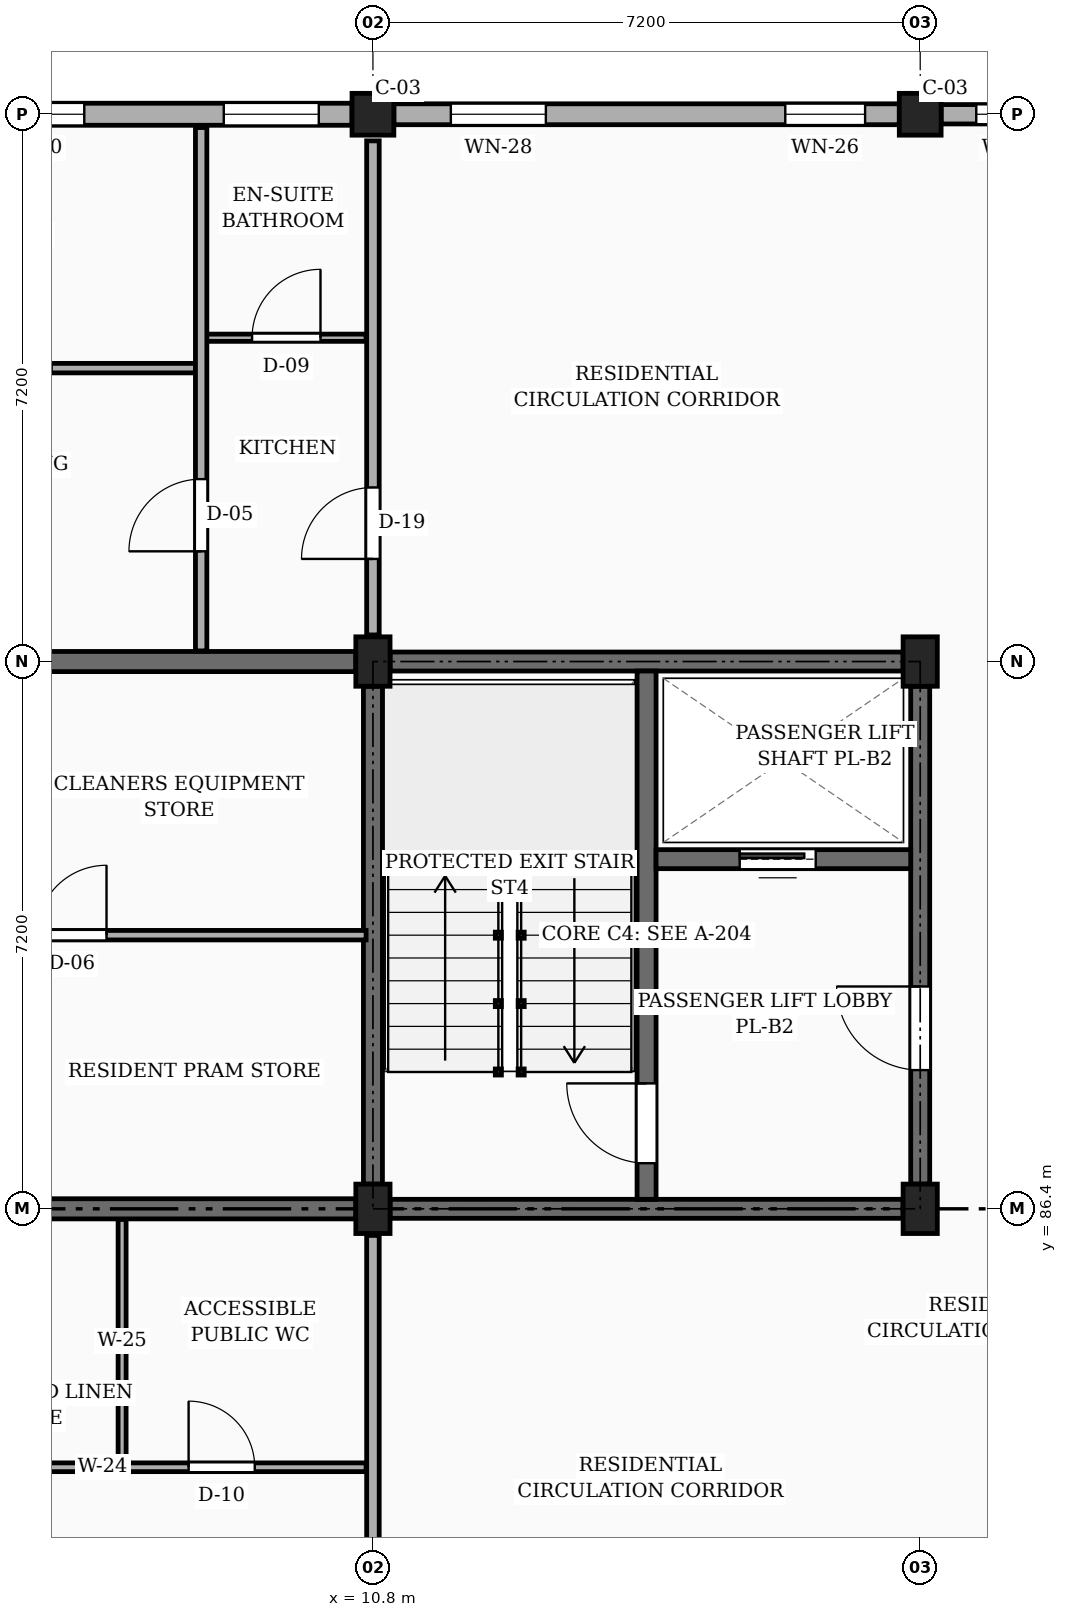
"""IFC4 building model, lengths in metres.
Left out: names, types, materials, properties, quantities, classifications, styles, units other than length and angle.
Written with IfcOpenShell. Run it as: python <this file> out.ifc"""

import sys

from ifc_helpers import new_model, si_unit, direction, frame, frame_2d, origin, origin_2d, place, context, subcontext, project, spatial, rectangle, extrude, element, fill, save


model = new_model("IFC4")
c1 = context("Model", 3, precision=1e-05, world=origin(), true_north=direction((0.0, 1.0)))
c2 = subcontext(c1, "Body", "Model", "MODEL_VIEW")
j1 = project(units=[si_unit("LENGTHUNIT", "METRE"), si_unit("PLANEANGLEUNIT", "RADIAN")], contexts=[c1])
p1 = place(None, origin())
s1 = spatial("IfcSite", under=j1, at=p1, CompositionType="ELEMENT")
p2 = place(p1, origin())
s2 = spatial("IfcBuilding", under=s1, at=p2, CompositionType="ELEMENT")
p3 = place(p2, frame((0.0, 0.0, 10.8)))
s3 = spatial("IfcBuildingStorey", under=s2, at=p3, CompositionType="ELEMENT", Elevation=10.8)
for number, where, z_axis, x_axis in (
    (1, (10.8, 86.4, 0.0), (0.0, 0.0, 1.0), (1.0, 0.0, 0.0)),
    (2, (10.8, 93.6, 0.0), (0.0, 0.0, 1.0), (1.0, 0.0, 0.0)),
):
    element("IfcColumn", number, at=place(p3, frame(where, z_axis=z_axis, x_axis=x_axis)), inside=s3, PredefinedType="COLUMN", context=c2, shape_type="SweptSolid", body=[
        extrude(rectangle(XDim=0.45, YDim=0.65, at=origin_2d()), origin(), (0.0, 0.0, 1.0), 3.15),
    ])
p4 = place(p3, frame((10.8, 100.8, 0.0), z_axis=(0.0, 0.0, 1.0), x_axis=(1.0, 0.0, 0.0)))
e3 = element("IfcColumn", 3, at=p4, inside=s3, PredefinedType="COLUMN", context=c2, shape_type="SweptSolid", body=[
    extrude(rectangle(XDim=0.55, YDim=0.55, at=origin_2d()), origin(), (0.0, 0.0, 1.0), 3.15),
])
for number, where, z_axis, x_axis in (
    (4, (18.0, 86.4, 0.0), (0.0, 0.0, 1.0), (1.0, 0.0, 0.0)),
    (5, (18.0, 93.6, 0.0), (0.0, 0.0, 1.0), (1.0, 0.0, 0.0)),
):
    element("IfcColumn", number, at=place(p3, frame(where, z_axis=z_axis, x_axis=x_axis)), inside=s3, PredefinedType="COLUMN", context=c2, shape_type="SweptSolid", body=[
        extrude(rectangle(XDim=0.45, YDim=0.65, at=origin_2d()), origin(), (0.0, 0.0, 1.0), 3.15),
    ])
p5 = place(p3, frame((18.0, 100.8, 0.0), z_axis=(0.0, 0.0, 1.0), x_axis=(1.0, 0.0, 0.0)))
e6 = element("IfcColumn", 6, at=p5, inside=s3, PredefinedType="COLUMN", context=c2, shape_type="SweptSolid", body=[
    extrude(rectangle(XDim=0.55, YDim=0.55, at=origin_2d()), origin(), (0.0, 0.0, 1.0), 3.15),
])
p6 = place(p3, frame((3.875, 86.4, 0.0), z_axis=(0.0, 0.0, 1.0), x_axis=(1.0, 0.0, 0.0)))
e7 = element("IfcWall", 7, at=p6, inside=s3, PredefinedType="SOLIDWALL", context=c2, shape_type="SweptSolid", body=[
    extrude(rectangle(XDim=6.7, YDim=0.265, at=frame_2d((3.35, 0.0))), origin(), (0.0, 0.0, 1.0), 2.21),
])
p7 = place(p6, frame((1.35, 0.0, 0.0)))
e8 = element("IfcOpeningElement", 8, at=p7, cuts=e7, PredefinedType="OPENING", context=c2, shape_type="SweptSolid", body=[
    extrude(rectangle(XDim=0.98, YDim=2.12, at=frame_2d((0.49, 1.06))), frame((0.0, 0.143, 0.0), z_axis=(0.0, -1.0, 0.0), x_axis=(1.0, 0.0, 0.0)), (0.0, 0.0, 1.0), 0.285),
])
p8 = place(p3, frame((3.875, 93.6, 0.0), z_axis=(0.0, 0.0, 1.0), x_axis=(1.0, 0.0, 0.0)))
e9 = element("IfcWall", 9, at=p8, inside=s3, PredefinedType="SOLIDWALL", context=c2, shape_type="SweptSolid", body=[
    extrude(rectangle(XDim=6.7, YDim=0.265, at=frame_2d((3.35, 0.0))), origin(), (0.0, 0.0, 1.0), 2.21),
])
p9 = place(p3, frame((24.925, 100.8, 0.0), z_axis=(0.0, 0.0, 1.0), x_axis=(-1.0, 0.0, 0.0)))
e10 = element("IfcWall", 10, at=p9, inside=s3, PredefinedType="SOLIDWALL", context=c2, shape_type="SweptSolid", body=[
    extrude(rectangle(XDim=6.65, YDim=0.255, at=frame_2d((3.325, 0.0))), origin(), (0.0, 0.0, 1.0), 2.48),
])
p10 = place(p9, frame((0.863, 0.0, 0.78)))
e11 = element("IfcOpeningElement", 11, at=p10, cuts=e10, PredefinedType="OPENING", context=c2, shape_type="SweptSolid", body=[
    extrude(rectangle(XDim=1.38, YDim=1.36, at=frame_2d((0.69, 0.68))), frame((0.0, 0.137, 0.0), z_axis=(0.0, -1.0, 0.0), x_axis=(1.0, 0.0, 0.0)), (0.0, 0.0, 1.0), 0.275),
])
p11 = place(p9, frame((3.425, 0.0, 0.78)))
e12 = element("IfcOpeningElement", 12, at=p11, cuts=e10, PredefinedType="OPENING", context=c2, shape_type="SweptSolid", body=[
    extrude(rectangle(XDim=0.94, YDim=1.44, at=frame_2d((0.47, 0.72))), frame((0.0, 0.137, 0.0), z_axis=(0.0, -1.0, 0.0), x_axis=(1.0, 0.0, 0.0)), (0.0, 0.0, 1.0), 0.275),
])
p12 = place(p9, frame((5.147, 0.0, 0.78)))
e13 = element("IfcOpeningElement", 13, at=p12, cuts=e10, PredefinedType="OPENING", context=c2, shape_type="SweptSolid", body=[
    extrude(rectangle(XDim=1.04, YDim=1.26, at=frame_2d((0.52, 0.63))), frame((0.0, 0.137, 0.0), z_axis=(0.0, -1.0, 0.0), x_axis=(1.0, 0.0, 0.0)), (0.0, 0.0, 1.0), 0.275),
])
p13 = place(p3, frame((17.725, 100.8, 0.0), z_axis=(0.0, 0.0, 1.0), x_axis=(-1.0, 0.0, 0.0)))
e14 = element("IfcWall", 14, at=p13, inside=s3, PredefinedType="SOLIDWALL", context=c2, shape_type="SweptSolid", body=[
    extrude(rectangle(XDim=6.65, YDim=0.275, at=frame_2d((3.325, 0.0))), origin(), (0.0, 0.0, 1.0), 2.48),
])
p14 = place(p13, frame((0.45, 0.0, 0.78)))
e15 = element("IfcOpeningElement", 15, at=p14, cuts=e14, PredefinedType="OPENING", context=c2, shape_type="SweptSolid", body=[
    extrude(rectangle(XDim=1.05, YDim=1.44, at=frame_2d((0.525, 0.72))), frame((0.0, 0.147, 0.0), z_axis=(0.0, -1.0, 0.0), x_axis=(1.0, 0.0, 0.0)), (0.0, 0.0, 1.0), 0.295),
])
p15 = place(p13, frame((4.65, 0.0, 0.78)))
e16 = element("IfcOpeningElement", 16, at=p15, cuts=e14, PredefinedType="OPENING", context=c2, shape_type="SweptSolid", body=[
    extrude(rectangle(XDim=1.25, YDim=1.44, at=frame_2d((0.625, 0.72))), frame((0.0, 0.147, 0.0), z_axis=(0.0, -1.0, 0.0), x_axis=(1.0, 0.0, 0.0)), (0.0, 0.0, 1.0), 0.295),
])
p16 = place(p3, frame((10.525, 100.8, 0.0), z_axis=(0.0, 0.0, 1.0), x_axis=(-1.0, 0.0, 0.0)))
e17 = element("IfcWall", 17, at=p16, inside=s3, PredefinedType="SOLIDWALL", context=c2, shape_type="SweptSolid", body=[
    extrude(rectangle(XDim=6.65, YDim=0.29, at=frame_2d((3.325, 0.0))), origin(), (0.0, 0.0, 1.0), 2.48),
])
p17 = place(p16, frame((0.438, 0.0, 0.78)))
e18 = element("IfcOpeningElement", 18, at=p17, cuts=e17, PredefinedType="OPENING", context=c2, shape_type="SweptSolid", body=[
    extrude(rectangle(XDim=1.25, YDim=1.44, at=frame_2d((0.625, 0.72))), frame((0.0, 0.155, 0.0), z_axis=(0.0, -1.0, 0.0), x_axis=(1.0, 0.0, 0.0)), (0.0, 0.0, 1.0), 0.31),
])
p18 = place(p16, frame((3.522, 0.0, 0.78)))
e19 = element("IfcOpeningElement", 19, at=p18, cuts=e17, PredefinedType="OPENING", context=c2, shape_type="SweptSolid", body=[
    extrude(rectangle(XDim=1.45, YDim=1.44, at=frame_2d((0.725, 0.72))), frame((0.0, 0.155, 0.0), z_axis=(0.0, -1.0, 0.0), x_axis=(1.0, 0.0, 0.0)), (0.0, 0.0, 1.0), 0.31),
])
p19 = place(p3, frame((10.8, 86.725, 0.0), z_axis=(0.0, 0.0, 1.0), x_axis=(0.0, 1.0, 0.0)))
e20 = element("IfcWall", 20, at=p19, inside=s3, PredefinedType="SHEAR", context=c2, shape_type="SweptSolid", body=[
    extrude(rectangle(XDim=6.55, YDim=0.25, at=frame_2d((3.275, 0.0))), origin(), (0.0, 0.0, 1.0), 2.91),
])
p20 = place(p3, frame((11.025, 93.6, 0.0), z_axis=(0.0, 0.0, 1.0), x_axis=(1.0, 0.0, 0.0)))
e21 = element("IfcWall", 21, at=p20, inside=s3, PredefinedType="SHEAR", context=c2, shape_type="SweptSolid", body=[
    extrude(rectangle(XDim=6.75, YDim=0.25, at=frame_2d((3.375, 0.0))), origin(), (0.0, 0.0, 1.0), 2.91),
])
p21 = place(p3, frame((18.0, 86.725, 0.0), z_axis=(0.0, 0.0, 1.0), x_axis=(0.0, 1.0, 0.0)))
e22 = element("IfcWall", 22, at=p21, inside=s3, PredefinedType="SHEAR", context=c2, shape_type="SweptSolid", body=[
    extrude(rectangle(XDim=6.55, YDim=0.25, at=frame_2d((3.275, 0.0))), origin(), (0.0, 0.0, 1.0), 2.91),
])
p22 = place(p21, frame((1.5, 0.0, 0.0)))
e23 = element("IfcOpeningElement", 23, at=p22, cuts=e22, PredefinedType="OPENING", context=c2, shape_type="SweptSolid", body=[
    extrude(rectangle(XDim=1.1, YDim=2.15, at=frame_2d((0.55, 1.075))), frame((0.0, 0.135, 0.0), z_axis=(0.0, -1.0, 0.0), x_axis=(1.0, 0.0, 0.0)), (0.0, 0.0, 1.0), 0.27),
])
p23 = place(p3, frame((11.025, 86.4, 0.0), z_axis=(0.0, 0.0, 1.0), x_axis=(1.0, 0.0, 0.0)))
e24 = element("IfcWall", 24, at=p23, inside=s3, PredefinedType="SHEAR", context=c2, shape_type="SweptSolid", body=[
    extrude(rectangle(XDim=6.75, YDim=0.25, at=frame_2d((3.375, 0.0))), origin(), (0.0, 0.0, 1.0), 2.91),
])
p24 = place(p3, frame((14.4, 86.525, 0.0), z_axis=(0.0, 0.0, 1.0), x_axis=(0.0, 1.0, 0.0)))
e25 = element("IfcWall", 25, at=p24, inside=s3, PredefinedType="SHEAR", context=c2, shape_type="SweptSolid", body=[
    extrude(rectangle(XDim=6.95, YDim=0.25, at=frame_2d((3.475, 0.0))), origin(), (0.0, 0.0, 1.0), 2.91),
])
p25 = place(p24, frame((0.475, 0.0, 0.0)))
e26 = element("IfcOpeningElement", 26, at=p25, cuts=e25, PredefinedType="OPENING", context=c2, shape_type="SweptSolid", body=[
    extrude(rectangle(XDim=1.05, YDim=2.15, at=frame_2d((0.525, 1.075))), frame((0.0, 0.135, 0.0), z_axis=(0.0, -1.0, 0.0), x_axis=(1.0, 0.0, 0.0)), (0.0, 0.0, 1.0), 0.27),
])
p26 = place(p3, frame((14.525, 91.0, 0.0), z_axis=(0.0, 0.0, 1.0), x_axis=(1.0, 0.0, 0.0)))
e27 = element("IfcWall", 27, at=p26, inside=s3, PredefinedType="SHEAR", context=c2, shape_type="SweptSolid", body=[
    extrude(rectangle(XDim=3.35, YDim=0.25, at=frame_2d((1.675, 0.0))), origin(), (0.0, 0.0, 1.0), 2.91),
])
p27 = place(p26, frame((1.1, 0.0, 0.0)))
e28 = element("IfcOpeningElement", 28, at=p27, cuts=e27, PredefinedType="OPENING", context=c2, shape_type="SweptSolid", body=[
    extrude(rectangle(XDim=1.0, YDim=2.2, at=frame_2d((0.5, 1.1))), frame((0.0, 0.135, 0.0), z_axis=(0.0, -1.0, 0.0), x_axis=(1.0, 0.0, 0.0)), (0.0, 0.0, 1.0), 0.27),
])
p28 = place(p3, frame((10.8, 79.55, 0.0), z_axis=(0.0, 0.0, 1.0), x_axis=(0.0, 1.0, 0.0)))
e29 = element("IfcWall", 29, at=p28, inside=s3, PredefinedType="PARTITIONING", context=c2, shape_type="SweptSolid", body=[
    extrude(rectangle(XDim=6.5, YDim=0.165, at=frame_2d((3.25, 0.0))), origin(), (0.0, 0.0, 1.0), 2.26),
])
p29 = place(p28, frame((1.1, 0.0, 0.0)))
e30 = element("IfcOpeningElement", 30, at=p29, cuts=e29, PredefinedType="OPENING", context=c2, shape_type="SweptSolid", body=[
    extrude(rectangle(XDim=1.0, YDim=2.15, at=frame_2d((0.5, 1.075))), frame((0.0, 0.093, 0.0), z_axis=(0.0, -1.0, 0.0), x_axis=(1.0, 0.0, 0.0)), (0.0, 0.0, 1.0), 0.185),
])
p30 = place(p3, frame((10.8, 93.95, 0.0), z_axis=(0.0, 0.0, 1.0), x_axis=(0.0, 1.0, 0.0)))
e31 = element("IfcWall", 31, at=p30, inside=s3, PredefinedType="PARTITIONING", context=c2, shape_type="SweptSolid", body=[
    extrude(rectangle(XDim=6.5, YDim=0.165, at=frame_2d((3.25, 0.0))), origin(), (0.0, 0.0, 1.0), 2.26),
])
p31 = place(p30, frame((1.0, 0.0, 0.0)))
e32 = element("IfcOpeningElement", 32, at=p31, cuts=e31, PredefinedType="OPENING", context=c2, shape_type="SweptSolid", body=[
    extrude(rectangle(XDim=0.94, YDim=2.12, at=frame_2d((0.47, 1.06))), frame((0.0, 0.093, 0.0), z_axis=(0.0, -1.0, 0.0), x_axis=(1.0, 0.0, 0.0)), (0.0, 0.0, 1.0), 0.185),
])
p32 = place(p3, frame((3.775, 83.0, 0.0), z_axis=(0.0, 0.0, 1.0), x_axis=(1.0, 0.0, 0.0)))
e33 = element("IfcWall", 33, at=p32, inside=s3, PredefinedType="PARTITIONING", context=c2, shape_type="SweptSolid", body=[
    extrude(rectangle(XDim=6.935, YDim=0.115, at=frame_2d((3.468, 0.0))), origin(), (0.0, 0.0, 1.0), 2.345),
])
p33 = place(p32, frame((4.6, 0.0, 0.0)))
e34 = element("IfcOpeningElement", 34, at=p33, cuts=e33, PredefinedType="OPENING", context=c2, shape_type="SweptSolid", body=[
    extrude(rectangle(XDim=0.87, YDim=2.05, at=frame_2d((0.435, 1.025))), frame((0.0, 0.067, 0.0), z_axis=(0.0, -1.0, 0.0), x_axis=(1.0, 0.0, 0.0)), (0.0, 0.0, 1.0), 0.135),
])
p34 = place(p32, frame((1.2, 0.0, 0.0)))
e35 = element("IfcOpeningElement", 35, at=p34, cuts=e33, PredefinedType="OPENING", context=c2, shape_type="SweptSolid", body=[
    extrude(rectangle(XDim=0.92, YDim=2.1, at=frame_2d((0.46, 1.05))), frame((0.0, 0.067, 0.0), z_axis=(0.0, -1.0, 0.0), x_axis=(1.0, 0.0, 0.0)), (0.0, 0.0, 1.0), 0.135),
])
p35 = place(p3, frame((7.5, 83.07, 0.0), z_axis=(0.0, 0.0, 1.0), x_axis=(0.0, 1.0, 0.0)))
e36 = element("IfcWall", 36, at=p35, inside=s3, PredefinedType="PARTITIONING", context=c2, shape_type="SweptSolid", body=[
    extrude(rectangle(XDim=3.19, YDim=0.105, at=frame_2d((1.595, 0.0))), origin(), (0.0, 0.0, 1.0), 2.345),
])
p36 = place(p3, frame((3.775, 90.0, 0.0), z_axis=(0.0, 0.0, 1.0), x_axis=(1.0, 0.0, 0.0)))
e37 = element("IfcWall", 37, at=p36, inside=s3, PredefinedType="PARTITIONING", context=c2, shape_type="SweptSolid", body=[
    extrude(rectangle(XDim=6.935, YDim=0.125, at=frame_2d((3.468, 0.0))), origin(), (0.0, 0.0, 1.0), 2.345),
])
p37 = place(p36, frame((2.6, 0.0, 0.0)))
e38 = element("IfcOpeningElement", 38, at=p37, cuts=e37, PredefinedType="OPENING", context=c2, shape_type="SweptSolid", body=[
    extrude(rectangle(XDim=0.92, YDim=2.1, at=frame_2d((0.46, 1.05))), frame((0.0, 0.073, 0.0), z_axis=(0.0, -1.0, 0.0), x_axis=(1.0, 0.0, 0.0)), (0.0, 0.0, 1.0), 0.145),
])
p38 = place(p3, frame((3.775, 97.46, 0.0), z_axis=(0.0, 0.0, 1.0), x_axis=(1.0, 0.0, 0.0)))
e39 = element("IfcWall", 39, at=p38, inside=s3, PredefinedType="PARTITIONING", context=c2, shape_type="SweptSolid", body=[
    extrude(rectangle(XDim=4.695, YDim=0.125, at=frame_2d((2.348, 0.0))), origin(), (0.0, 0.0, 1.0), 2.345),
])
p39 = place(p38, frame((1.897, 0.0, 0.0)))
e40 = element("IfcOpeningElement", 40, at=p39, cuts=e39, PredefinedType="OPENING", context=c2, shape_type="SweptSolid", body=[
    extrude(rectangle(XDim=0.9, YDim=2.1, at=frame_2d((0.45, 1.05))), frame((0.0, 0.073, 0.0), z_axis=(0.0, -1.0, 0.0), x_axis=(1.0, 0.0, 0.0)), (0.0, 0.0, 1.0), 0.145),
])
p40 = place(p3, frame((8.61, 97.86, 0.0), z_axis=(0.0, 0.0, 1.0), x_axis=(1.0, 0.0, 0.0)))
e41 = element("IfcWall", 41, at=p40, inside=s3, PredefinedType="PARTITIONING", context=c2, shape_type="SweptSolid", body=[
    extrude(rectangle(XDim=2.1, YDim=0.095, at=frame_2d((1.05, 0.0))), origin(), (0.0, 0.0, 1.0), 2.345),
])
p41 = place(p40, frame((0.6, 0.0, 0.0)))
e42 = element("IfcOpeningElement", 42, at=p41, cuts=e41, PredefinedType="OPENING", context=c2, shape_type="SweptSolid", body=[
    extrude(rectangle(XDim=0.9, YDim=2.05, at=frame_2d((0.45, 1.025))), frame((0.0, 0.058, 0.0), z_axis=(0.0, -1.0, 0.0), x_axis=(1.0, 0.0, 0.0)), (0.0, 0.0, 1.0), 0.115),
])
p42 = place(p3, frame((8.54, 93.74, 0.0), z_axis=(0.0, 0.0, 1.0), x_axis=(0.0, 1.0, 0.0)))
e43 = element("IfcWall", 43, at=p42, inside=s3, PredefinedType="PARTITIONING", context=c2, shape_type="SweptSolid", body=[
    extrude(rectangle(XDim=6.885, YDim=0.15, at=frame_2d((3.442, 0.0))), origin(), (0.0, 0.0, 1.0), 2.345),
])
p43 = place(p42, frame((1.31, 0.0, 0.0)))
e44 = element("IfcOpeningElement", 44, at=p43, cuts=e43, PredefinedType="OPENING", context=c2, shape_type="SweptSolid", body=[
    extrude(rectangle(XDim=0.95, YDim=2.1, at=frame_2d((0.475, 1.05))), frame((0.0, 0.085, 0.0), z_axis=(0.0, -1.0, 0.0), x_axis=(1.0, 0.0, 0.0)), (0.0, 0.0, 1.0), 0.17),
])
p44 = place(p12, origin())
e45 = element("IfcWindow", 45, at=p44, inside=s3, PartitioningType="SINGLE_PANEL", PredefinedType="WINDOW", context=c2, shape_type="SweptSolid", body=[
    extrude(rectangle(XDim=1.04, YDim=1.26, at=frame_2d((0.52, 0.63))), frame((0.0, 0.03, 0.0), z_axis=(0.0, -1.0, 0.0), x_axis=(1.0, 0.0, 0.0)), (0.0, 0.0, 1.0), 0.06),
])
fill(e13, e45)
p45 = place(p14, origin())
e46 = element("IfcWindow", 46, at=p45, inside=s3, PartitioningType="SINGLE_PANEL", PredefinedType="WINDOW", context=c2, shape_type="SweptSolid", body=[
    extrude(rectangle(XDim=1.05, YDim=1.44, at=frame_2d((0.525, 0.72))), frame((0.0, 0.03, 0.0), z_axis=(0.0, -1.0, 0.0), x_axis=(1.0, 0.0, 0.0)), (0.0, 0.0, 1.0), 0.06),
])
fill(e15, e46)
p46 = place(p15, origin())
e47 = element("IfcWindow", 47, at=p46, inside=s3, PartitioningType="SINGLE_PANEL", PredefinedType="WINDOW", context=c2, shape_type="SweptSolid", body=[
    extrude(rectangle(XDim=1.25, YDim=1.44, at=frame_2d((0.625, 0.72))), frame((0.0, 0.03, 0.0), z_axis=(0.0, -1.0, 0.0), x_axis=(1.0, 0.0, 0.0)), (0.0, 0.0, 1.0), 0.06),
])
fill(e16, e47)
p47 = place(p17, origin())
e48 = element("IfcWindow", 48, at=p47, inside=s3, PartitioningType="SINGLE_PANEL", PredefinedType="WINDOW", context=c2, shape_type="SweptSolid", body=[
    extrude(rectangle(XDim=1.25, YDim=1.44, at=frame_2d((0.625, 0.72))), frame((0.0, 0.03, 0.0), z_axis=(0.0, -1.0, 0.0), x_axis=(1.0, 0.0, 0.0)), (0.0, 0.0, 1.0), 0.06),
])
fill(e18, e48)
p48 = place(p18, origin())
e49 = element("IfcWindow", 49, at=p48, inside=s3, PartitioningType="SINGLE_PANEL", PredefinedType="WINDOW", context=c2, shape_type="SweptSolid", body=[
    extrude(rectangle(XDim=1.45, YDim=1.44, at=frame_2d((0.725, 0.72))), frame((0.0, 0.03, 0.0), z_axis=(0.0, -1.0, 0.0), x_axis=(1.0, 0.0, 0.0)), (0.0, 0.0, 1.0), 0.06),
])
fill(e19, e49)
p49 = place(p22, frame((1.1, 0.0, 0.0), z_axis=(0.0, 0.0, 1.0), x_axis=(-1.0, 0.0, 0.0)))
e50 = element("IfcDoor", 50, at=p49, inside=s3, OperationType="SINGLE_SWING_RIGHT", PredefinedType="DOOR", context=c2, shape_type="SweptSolid", body=[
    extrude(rectangle(XDim=1.1, YDim=2.15, at=frame_2d((0.55, 1.075))), frame((0.0, 0.025, 0.0), z_axis=(0.0, -1.0, 0.0), x_axis=(1.0, 0.0, 0.0)), (0.0, 0.0, 1.0), 0.05),
])
fill(e23, e50)
p50 = place(p25, origin())
e51 = element("IfcDoor", 51, at=p50, inside=s3, OperationType="SINGLE_SWING_RIGHT", PredefinedType="DOOR", context=c2, shape_type="SweptSolid", body=[
    extrude(rectangle(XDim=1.05, YDim=2.15, at=frame_2d((0.525, 1.075))), frame((0.0, 0.025, 0.0), z_axis=(0.0, -1.0, 0.0), x_axis=(1.0, 0.0, 0.0)), (0.0, 0.0, 1.0), 0.05),
])
fill(e26, e51)
p51 = place(p27, origin())
e52 = element("IfcDoor", 52, at=p51, inside=s3, OperationType="SLIDING_TO_LEFT", PredefinedType="DOOR", context=c2, shape_type="SweptSolid", body=[
    extrude(rectangle(XDim=1.0, YDim=2.2, at=frame_2d((0.5, 1.1))), frame((0.0, 0.025, 0.0), z_axis=(0.0, -1.0, 0.0), x_axis=(1.0, 0.0, 0.0)), (0.0, 0.0, 1.0), 0.05),
])
fill(e28, e52)
p52 = place(p31, origin())
e53 = element("IfcDoor", 53, at=p52, inside=s3, OperationType="SINGLE_SWING_LEFT", PredefinedType="DOOR", context=c2, shape_type="SweptSolid", body=[
    extrude(rectangle(XDim=0.94, YDim=2.12, at=frame_2d((0.47, 1.06))), frame((0.0, 0.025, 0.0), z_axis=(0.0, -1.0, 0.0), x_axis=(1.0, 0.0, 0.0)), (0.0, 0.0, 1.0), 0.05),
])
fill(e32, e53)
p53 = place(p33, origin())
e54 = element("IfcDoor", 54, at=p53, inside=s3, OperationType="SINGLE_SWING_LEFT", PredefinedType="DOOR", context=c2, shape_type="SweptSolid", body=[
    extrude(rectangle(XDim=0.87, YDim=2.05, at=frame_2d((0.435, 1.025))), frame((0.0, 0.025, 0.0), z_axis=(0.0, -1.0, 0.0), x_axis=(1.0, 0.0, 0.0)), (0.0, 0.0, 1.0), 0.05),
])
fill(e34, e54)
p54 = place(p37, origin())
e55 = element("IfcDoor", 55, at=p54, inside=s3, OperationType="SINGLE_SWING_RIGHT", PredefinedType="DOOR", context=c2, shape_type="SweptSolid", body=[
    extrude(rectangle(XDim=0.92, YDim=2.1, at=frame_2d((0.46, 1.05))), frame((0.0, 0.025, 0.0), z_axis=(0.0, -1.0, 0.0), x_axis=(1.0, 0.0, 0.0)), (0.0, 0.0, 1.0), 0.05),
])
fill(e38, e55)
p55 = place(p41, origin())
e56 = element("IfcDoor", 56, at=p55, inside=s3, OperationType="SINGLE_SWING_RIGHT", PredefinedType="DOOR", context=c2, shape_type="SweptSolid", body=[
    extrude(rectangle(XDim=0.9, YDim=2.05, at=frame_2d((0.45, 1.025))), frame((0.0, 0.025, 0.0), z_axis=(0.0, -1.0, 0.0), x_axis=(1.0, 0.0, 0.0)), (0.0, 0.0, 1.0), 0.05),
])
fill(e42, e56)
p56 = place(p43, origin())
e57 = element("IfcDoor", 57, at=p56, inside=s3, OperationType="SINGLE_SWING_LEFT", PredefinedType="DOOR", context=c2, shape_type="SweptSolid", body=[
    extrude(rectangle(XDim=0.95, YDim=2.1, at=frame_2d((0.475, 1.05))), frame((0.0, 0.025, 0.0), z_axis=(0.0, -1.0, 0.0), x_axis=(1.0, 0.0, 0.0)), (0.0, 0.0, 1.0), 0.05),
])
fill(e44, e57)
save(model, sys.argv[1])
